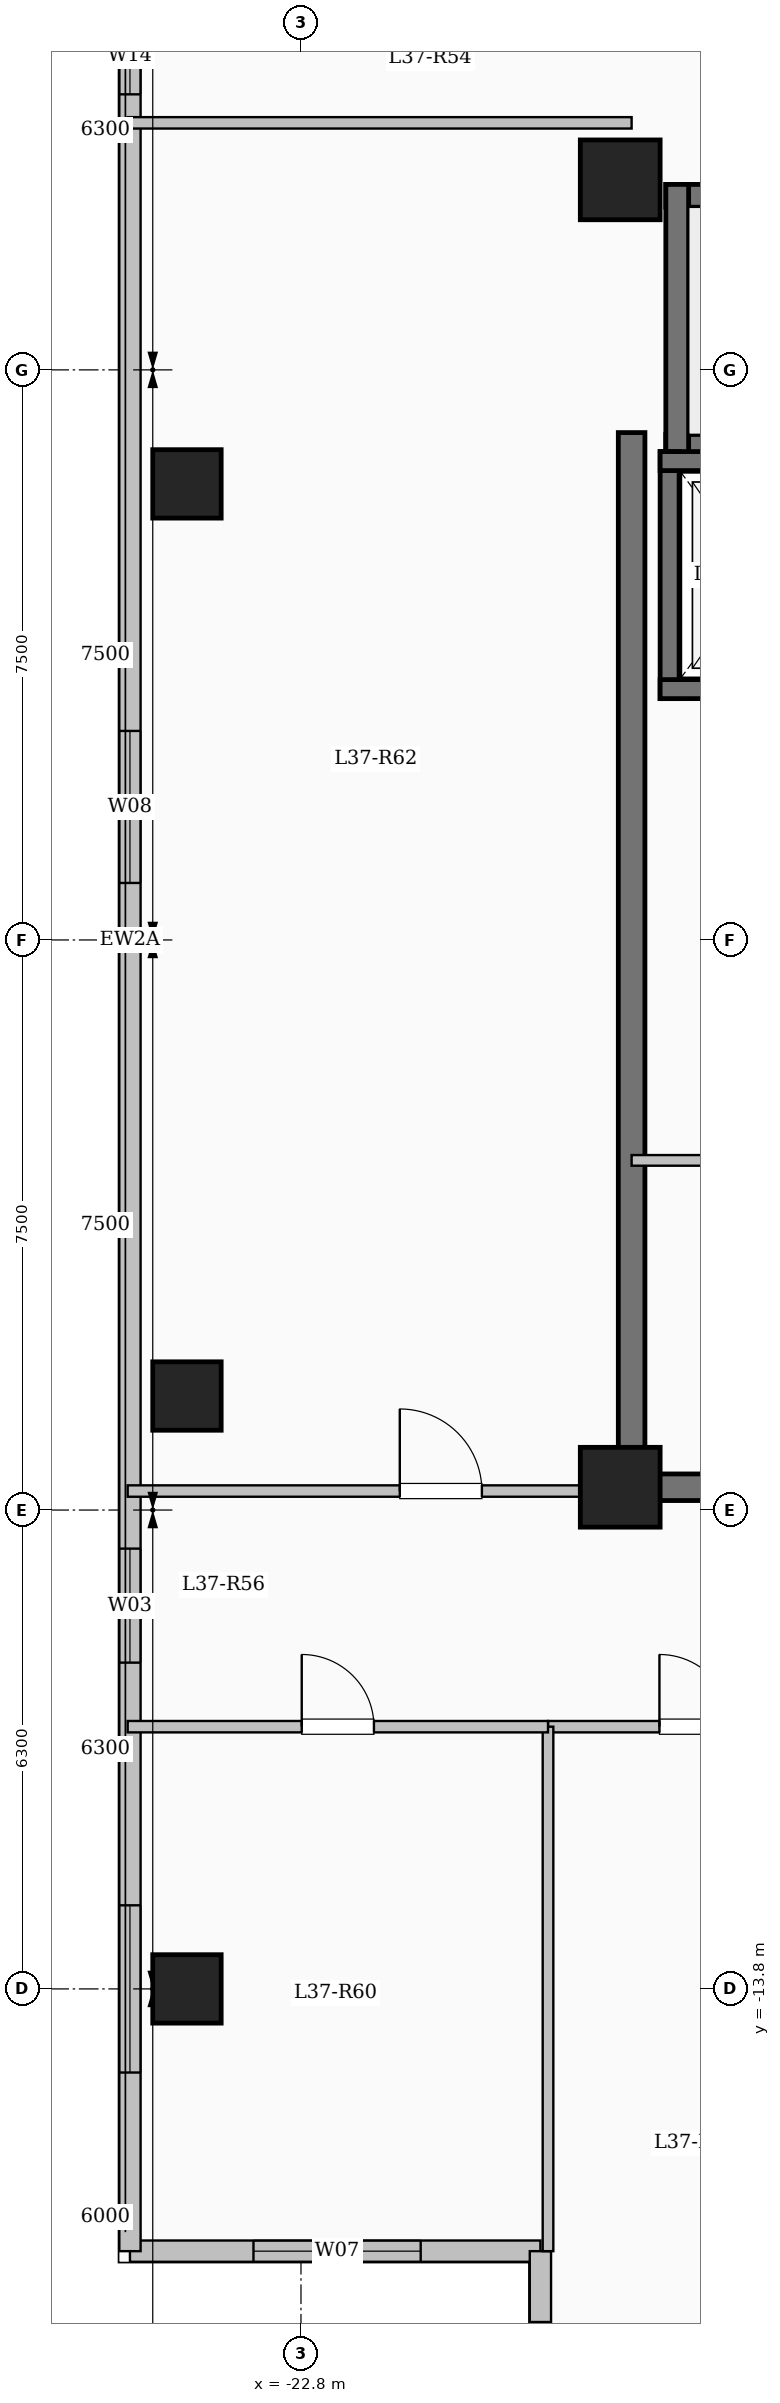
"""IFC4 building model, lengths in metres.
Left out: names, types, materials, properties, quantities, classifications, styles, units other than length and angle.
Written with IfcOpenShell. Run it as: python <this file> out.ifc"""

import sys

from ifc_helpers import new_model, si_unit, direction, frame, frame_2d, origin, origin_2d, place, context, subcontext, project, spatial, rectangle, extrude, element, fill, save


model = new_model("IFC4")
c1 = context("Model", 3, precision=1e-05, world=origin(), true_north=direction((0.0, 1.0)))
c2 = subcontext(c1, "Body", "Model", "MODEL_VIEW")
j1 = project(units=[si_unit("LENGTHUNIT", "METRE"), si_unit("PLANEANGLEUNIT", "RADIAN")], contexts=[c1])
p1 = place(None, origin())
s1 = spatial("IfcSite", under=j1, at=p1, CompositionType="ELEMENT")
p2 = place(p1, origin())
s2 = spatial("IfcBuilding", under=s1, at=p2, CompositionType="ELEMENT")
p3 = place(p2, frame((0.0, 0.0, 139.3)))
s3 = spatial("IfcBuildingStorey", under=s2, at=p3, CompositionType="ELEMENT", Elevation=139.3)
for number, where, z_axis, x_axis in (
    (1, (-18.6, -7.2, 0.0), (0.0, 0.0, 1.0), (1.0, 0.0, 0.0)),
    (2, (-18.6, 10.0, 0.0), (0.0, 0.0, 1.0), (1.0, 0.0, 0.0)),
):
    element("IfcColumn", number, at=place(p3, frame(where, z_axis=z_axis, x_axis=x_axis)), inside=s3, PredefinedType="COLUMN", context=c2, shape_type="SweptSolid", body=[
        extrude(rectangle(XDim=1.05, YDim=1.05, at=origin_2d()), origin(), (0.0, 0.0, 1.0), 3.35),
    ])
for number, where, z_axis, x_axis in (
    (3, (-24.3, -13.8, 0.0), (0.0, 0.0, 1.0), (1.0, 0.0, 0.0)),
    (4, (-24.3, -6.0, 0.0), (0.0, 0.0, 1.0), (1.0, 0.0, 0.0)),
    (5, (-24.3, 6.0, 0.0), (0.0, 0.0, 1.0), (1.0, 0.0, 0.0)),
):
    element("IfcColumn", number, at=place(p3, frame(where, z_axis=z_axis, x_axis=x_axis)), inside=s3, PredefinedType="COLUMN", context=c2, shape_type="SweptSolid", body=[
        extrude(rectangle(XDim=0.9, YDim=0.9, at=origin_2d()), origin(), (0.0, 0.0, 1.0), 3.35),
    ])
p4 = place(p3, frame((-19.65, -17.25, 0.0), z_axis=(0.0, 0.0, 1.0), x_axis=(-1.0, 0.0, 0.0)))
e6 = element("IfcWall", 6, at=p4, inside=s3, PredefinedType="SOLIDWALL", context=c2, shape_type="SweptSolid", body=[
    extrude(rectangle(XDim=5.4, YDim=0.28, at=frame_2d((2.7, 0.0))), origin(), (0.0, 0.0, 1.0), 3.1),
])
p5 = place(p4, frame((1.575, 0.0, 0.9)))
e7 = element("IfcOpeningElement", 7, at=p5, cuts=e6, PredefinedType="OPENING", context=c2, shape_type="SweptSolid", body=[
    extrude(rectangle(XDim=2.2, YDim=1.75, at=frame_2d((1.1, 0.875))), frame((0.0, 0.15, 0.0), z_axis=(0.0, -1.0, 0.0), x_axis=(1.0, 0.0, 0.0)), (0.0, 0.0, 1.0), 0.3),
])
p6 = place(p3, frame((-25.05, -17.25, 0.0), z_axis=(0.0, 0.0, 1.0), x_axis=(0.0, 1.0, 0.0)))
e8 = element("IfcWall", 8, at=p6, inside=s3, PredefinedType="SOLIDWALL", context=c2, shape_type="SweptSolid", body=[
    extrude(rectangle(XDim=34.5, YDim=0.28, at=frame_2d((17.25, 0.0))), origin(), (0.0, 0.0, 1.0), 3.1),
])
p7 = place(p6, frame((2.35, 0.0, 0.9)))
e9 = element("IfcOpeningElement", 9, at=p7, cuts=e8, PredefinedType="OPENING", context=c2, shape_type="SweptSolid", body=[
    extrude(rectangle(XDim=2.2, YDim=1.75, at=frame_2d((1.1, 0.875))), frame((0.0, 0.15, 0.0), z_axis=(0.0, -1.0, 0.0), x_axis=(1.0, 0.0, 0.0)), (0.0, 0.0, 1.0), 0.3),
])
p8 = place(p6, frame((7.742, 0.0, 0.9)))
e10 = element("IfcOpeningElement", 10, at=p8, cuts=e8, PredefinedType="OPENING", context=c2, shape_type="SweptSolid", body=[
    extrude(rectangle(XDim=1.5, YDim=1.65, at=frame_2d((0.75, 0.825))), frame((0.0, 0.15, 0.0), z_axis=(0.0, -1.0, 0.0), x_axis=(1.0, 0.0, 0.0)), (0.0, 0.0, 1.0), 0.3),
])
p9 = place(p6, frame((18.0, 0.0, 0.9)))
e11 = element("IfcOpeningElement", 11, at=p9, cuts=e8, PredefinedType="OPENING", context=c2, shape_type="SweptSolid", body=[
    extrude(rectangle(XDim=2.0, YDim=1.7, at=frame_2d((1.0, 0.85))), frame((0.0, 0.15, 0.0), z_axis=(0.0, -1.0, 0.0), x_axis=(1.0, 0.0, 0.0)), (0.0, 0.0, 1.0), 0.3),
])
p10 = place(p6, frame((28.375, 0.0, 0.95)))
e12 = element("IfcOpeningElement", 12, at=p10, cuts=e8, PredefinedType="OPENING", context=c2, shape_type="SweptSolid", body=[
    extrude(rectangle(XDim=1.0, YDim=1.5, at=frame_2d((0.5, 0.75))), frame((0.0, 0.15, 0.0), z_axis=(0.0, -1.0, 0.0), x_axis=(1.0, 0.0, 0.0)), (0.0, 0.0, 1.0), 0.3),
])
p11 = place(p6, frame((31.125, 0.0, 0.9)))
e13 = element("IfcOpeningElement", 13, at=p11, cuts=e8, PredefinedType="OPENING", context=c2, shape_type="SweptSolid", body=[
    extrude(rectangle(XDim=2.0, YDim=1.7, at=frame_2d((1.0, 0.85))), frame((0.0, 0.15, 0.0), z_axis=(0.0, -1.0, 0.0), x_axis=(1.0, 0.0, 0.0)), (0.0, 0.0, 1.0), 0.3),
])
p12 = place(p3, frame((-19.65, -21.15, 0.0), z_axis=(0.0, 0.0, 1.0), x_axis=(0.0, 1.0, 0.0)))
e14 = element("IfcWall", 14, at=p12, inside=s3, PredefinedType="SOLIDWALL", context=c2, shape_type="SweptSolid", body=[
    extrude(rectangle(XDim=3.9, YDim=0.28, at=frame_2d((1.95, 0.0))), origin(), (0.0, 0.0, 1.0), 3.1),
])
p13 = place(p12, frame((0.968, 0.0, 0.9)))
e15 = element("IfcOpeningElement", 15, at=p13, cuts=e14, PredefinedType="OPENING", context=c2, shape_type="SweptSolid", body=[
    extrude(rectangle(XDim=2.0, YDim=1.7, at=frame_2d((1.0, 0.85))), frame((0.0, 0.15, 0.0), z_axis=(0.0, -1.0, 0.0), x_axis=(1.0, 0.0, 0.0)), (0.0, 0.0, 1.0), 0.3),
])
p14 = place(p3, frame((-18.0, 9.79, 0.0), z_axis=(0.0, 0.0, 1.0), x_axis=(1.0, 0.0, 0.0)))
e16 = element("IfcWall", 16, at=p14, inside=s3, PredefinedType="SHEAR", context=c2, shape_type="SweptSolid", body=[
    extrude(rectangle(XDim=8.0, YDim=0.3, at=frame_2d((4.0, 0.0))), origin(), (0.0, 0.0, 1.0), 3.35),
])
p15 = place(p3, frame((-18.0, 6.5, 0.0), z_axis=(0.0, 0.0, 1.0), x_axis=(1.0, 0.0, 0.0)))
e17 = element("IfcWall", 17, at=p15, inside=s3, PredefinedType="SHEAR", context=c2, shape_type="SweptSolid", body=[
    extrude(rectangle(XDim=8.0, YDim=0.3, at=frame_2d((4.0, 0.0))), origin(), (0.0, 0.0, 1.0), 3.35),
])
p16 = place(p15, frame((6.45, 0.0, 0.0)))
e18 = element("IfcOpeningElement", 18, at=p16, cuts=e17, PredefinedType="OPENING", context=c2, shape_type="SweptSolid", body=[
    extrude(rectangle(XDim=1.0, YDim=2.15, at=frame_2d((0.5, 1.075))), frame((0.0, 0.16, 0.0), z_axis=(0.0, -1.0, 0.0), x_axis=(1.0, 0.0, 0.0)), (0.0, 0.0, 1.0), 0.32),
])
p17 = place(p3, frame((-17.85, 6.35, 0.0), z_axis=(0.0, 0.0, 1.0), x_axis=(0.0, 1.0, 0.0)))
e19 = element("IfcWall", 19, at=p17, inside=s3, PredefinedType="SHEAR", context=c2, shape_type="SweptSolid", body=[
    extrude(rectangle(XDim=3.59, YDim=0.3, at=frame_2d((1.795, 0.0))), origin(), (0.0, 0.0, 1.0), 3.35),
])
p18 = place(p3, frame((-17.95, 3.175, 0.0), z_axis=(0.0, 0.0, 1.0), x_axis=(0.0, 1.0, 0.0)))
e20 = element("IfcWall", 20, at=p18, inside=s3, PredefinedType="SHEAR", context=c2, shape_type="SweptSolid", body=[
    extrude(rectangle(XDim=3.25, YDim=0.25, at=frame_2d((1.625, 0.0))), origin(), (0.0, 0.0, 1.0), 3.35),
])
for number, where, z_axis, x_axis in (
    (21, (-18.075, 3.3, 0.0), (0.0, 0.0, 1.0), (1.0, 0.0, 0.0)),
    (22, (-18.075, 6.3, 0.0), (0.0, 0.0, 1.0), (1.0, 0.0, 0.0)),
):
    element("IfcWall", number, at=place(p3, frame(where, z_axis=z_axis, x_axis=x_axis)), inside=s3, PredefinedType="SHEAR", context=c2, shape_type="SweptSolid", body=[
        extrude(rectangle(XDim=2.55, YDim=0.25, at=frame_2d((1.275, 0.0))), origin(), (0.0, 0.0, 1.0), 3.35),
    ])
p19 = place(p3, frame((-18.45, -7.375, 0.0), z_axis=(0.0, 0.0, 1.0), x_axis=(0.0, 1.0, 0.0)))
e23 = element("IfcWall", 23, at=p19, inside=s3, PredefinedType="SHEAR", context=c2, shape_type="SweptSolid", body=[
    extrude(rectangle(XDim=14.05, YDim=0.35, at=frame_2d((7.025, 0.0))), origin(), (0.0, 0.0, 1.0), 3.35),
])
p20 = place(p3, frame((-18.625, -7.2, 0.0), z_axis=(0.0, 0.0, 1.0), x_axis=(1.0, 0.0, 0.0)))
e24 = element("IfcWall", 24, at=p20, inside=s3, PredefinedType="SHEAR", context=c2, shape_type="SweptSolid", body=[
    extrude(rectangle(XDim=8.55, YDim=0.35, at=frame_2d((4.275, 0.0))), origin(), (0.0, 0.0, 1.0), 3.35),
])
p21 = place(p3, frame((-18.45, -2.9, 0.0), z_axis=(0.0, 0.0, 1.0), x_axis=(1.0, 0.0, 0.0)))
e25 = element("IfcWall", 25, at=p21, inside=s3, PredefinedType="PARTITIONING", context=c2, shape_type="SweptSolid", body=[
    extrude(rectangle(XDim=3.05, YDim=0.14, at=frame_2d((1.525, 0.0))), origin(), (0.0, 0.0, 1.0), 3.1),
])
p22 = place(p21, frame((1.05, 0.0, 0.0)))
e26 = element("IfcOpeningElement", 26, at=p22, cuts=e25, PredefinedType="OPENING", context=c2, shape_type="SweptSolid", body=[
    extrude(rectangle(XDim=0.9, YDim=2.08, at=frame_2d((0.45, 1.04))), frame((0.0, 0.08, 0.0), z_axis=(0.0, -1.0, 0.0), x_axis=(1.0, 0.0, 0.0)), (0.0, 0.0, 1.0), 0.16),
])
p23 = place(p3, frame((-19.55, -10.35, 0.0), z_axis=(0.0, 0.0, 1.0), x_axis=(1.0, 0.0, 0.0)))
e27 = element("IfcWall", 27, at=p23, inside=s3, PredefinedType="PARTITIONING", context=c2, shape_type="SweptSolid", body=[
    extrude(rectangle(XDim=11.0, YDim=0.15, at=frame_2d((5.5, 0.0))), origin(), (0.0, 0.0, 1.0), 3.1),
])
p24 = place(p23, frame((1.466, 0.0, 0.0)))
e28 = element("IfcOpeningElement", 28, at=p24, cuts=e27, PredefinedType="OPENING", context=c2, shape_type="SweptSolid", body=[
    extrude(rectangle(XDim=0.95, YDim=2.15, at=frame_2d((0.475, 1.075))), frame((0.0, 0.085, 0.0), z_axis=(0.0, -1.0, 0.0), x_axis=(1.0, 0.0, 0.0)), (0.0, 0.0, 1.0), 0.17),
])
p25 = place(p23, frame((5.438, 0.0, 0.0)))
e29 = element("IfcOpeningElement", 29, at=p25, cuts=e27, PredefinedType="OPENING", context=c2, shape_type="SweptSolid", body=[
    extrude(rectangle(XDim=0.95, YDim=2.15, at=frame_2d((0.475, 1.075))), frame((0.0, 0.085, 0.0), z_axis=(0.0, -1.0, 0.0), x_axis=(1.0, 0.0, 0.0)), (0.0, 0.0, 1.0), 0.17),
])
p26 = place(p23, frame((8.972, 0.0, 0.0)))
e30 = element("IfcOpeningElement", 30, at=p26, cuts=e27, PredefinedType="OPENING", context=c2, shape_type="SweptSolid", body=[
    extrude(rectangle(XDim=0.95, YDim=2.15, at=frame_2d((0.475, 1.075))), frame((0.0, 0.085, 0.0), z_axis=(0.0, -1.0, 0.0), x_axis=(1.0, 0.0, 0.0)), (0.0, 0.0, 1.0), 0.17),
])
p27 = place(p3, frame((-25.08, -7.25, 0.0), z_axis=(0.0, 0.0, 1.0), x_axis=(1.0, 0.0, 0.0)))
e31 = element("IfcWall", 31, at=p27, inside=s3, PredefinedType="PARTITIONING", context=c2, shape_type="SweptSolid", body=[
    extrude(rectangle(XDim=6.63, YDim=0.15, at=frame_2d((3.315, 0.0))), origin(), (0.0, 0.0, 1.0), 3.1),
])
p28 = place(p27, frame((3.58, 0.0, 0.0)))
e32 = element("IfcOpeningElement", 32, at=p28, cuts=e31, PredefinedType="OPENING", context=c2, shape_type="SweptSolid", body=[
    extrude(rectangle(XDim=1.08, YDim=2.15, at=frame_2d((0.54, 1.075))), frame((0.0, 0.085, 0.0), z_axis=(0.0, -1.0, 0.0), x_axis=(1.0, 0.0, 0.0)), (0.0, 0.0, 1.0), 0.17),
])
p29 = place(p3, frame((-25.08, 10.75, 0.0), z_axis=(0.0, 0.0, 1.0), x_axis=(1.0, 0.0, 0.0)))
e33 = element("IfcWall", 33, at=p29, inside=s3, PredefinedType="PARTITIONING", context=c2, shape_type="SweptSolid", body=[
    extrude(rectangle(XDim=6.63, YDim=0.15, at=frame_2d((3.315, 0.0))), origin(), (0.0, 0.0, 1.0), 3.1),
])
p30 = place(p3, frame((-19.55, -17.25, 0.0), z_axis=(0.0, 0.0, 1.0), x_axis=(0.0, 1.0, 0.0)))
e34 = element("IfcWall", 34, at=p30, inside=s3, PredefinedType="PARTITIONING", context=c2, shape_type="SweptSolid", body=[
    extrude(rectangle(XDim=6.9, YDim=0.14, at=frame_2d((3.45, 0.0))), origin(), (0.0, 0.0, 1.0), 3.1),
])
p31 = place(p3, frame((-25.08, -10.35, 0.0), z_axis=(0.0, 0.0, 1.0), x_axis=(1.0, 0.0, 0.0)))
e35 = element("IfcWall", 35, at=p31, inside=s3, PredefinedType="PARTITIONING", context=c2, shape_type="SweptSolid", body=[
    extrude(rectangle(XDim=5.53, YDim=0.15, at=frame_2d((2.765, 0.0))), origin(), (0.0, 0.0, 1.0), 3.1),
])
p32 = place(p31, frame((2.29, 0.0, 0.0)))
e36 = element("IfcOpeningElement", 36, at=p32, cuts=e35, PredefinedType="OPENING", context=c2, shape_type="SweptSolid", body=[
    extrude(rectangle(XDim=0.95, YDim=2.15, at=frame_2d((0.475, 1.075))), frame((0.0, 0.085, 0.0), z_axis=(0.0, -1.0, 0.0), x_axis=(1.0, 0.0, 0.0)), (0.0, 0.0, 1.0), 0.17),
])
p33 = place(p5, origin())
e37 = element("IfcWindow", 37, at=p33, inside=s3, PartitioningType="SINGLE_PANEL", PredefinedType="WINDOW", context=c2, shape_type="SweptSolid", body=[
    extrude(rectangle(XDim=2.2, YDim=1.75, at=frame_2d((1.1, 0.875))), frame((0.0, 0.03, 0.0), z_axis=(0.0, -1.0, 0.0), x_axis=(1.0, 0.0, 0.0)), (0.0, 0.0, 1.0), 0.06),
])
fill(e7, e37)
p34 = place(p7, origin())
e38 = element("IfcWindow", 38, at=p34, inside=s3, PartitioningType="SINGLE_PANEL", PredefinedType="WINDOW", context=c2, shape_type="SweptSolid", body=[
    extrude(rectangle(XDim=2.2, YDim=1.75, at=frame_2d((1.1, 0.875))), frame((0.0, 0.03, 0.0), z_axis=(0.0, -1.0, 0.0), x_axis=(1.0, 0.0, 0.0)), (0.0, 0.0, 1.0), 0.06),
])
fill(e9, e38)
p35 = place(p8, origin())
e39 = element("IfcWindow", 39, at=p35, inside=s3, PartitioningType="SINGLE_PANEL", PredefinedType="WINDOW", context=c2, shape_type="SweptSolid", body=[
    extrude(rectangle(XDim=1.5, YDim=1.65, at=frame_2d((0.75, 0.825))), frame((0.0, 0.03, 0.0), z_axis=(0.0, -1.0, 0.0), x_axis=(1.0, 0.0, 0.0)), (0.0, 0.0, 1.0), 0.06),
])
fill(e10, e39)
p36 = place(p9, origin())
e40 = element("IfcWindow", 40, at=p36, inside=s3, PartitioningType="SINGLE_PANEL", PredefinedType="WINDOW", context=c2, shape_type="SweptSolid", body=[
    extrude(rectangle(XDim=2.0, YDim=1.7, at=frame_2d((1.0, 0.85))), frame((0.0, 0.03, 0.0), z_axis=(0.0, -1.0, 0.0), x_axis=(1.0, 0.0, 0.0)), (0.0, 0.0, 1.0), 0.06),
])
fill(e11, e40)
p37 = place(p10, origin())
e41 = element("IfcWindow", 41, at=p37, inside=s3, PartitioningType="SINGLE_PANEL", PredefinedType="WINDOW", context=c2, shape_type="SweptSolid", body=[
    extrude(rectangle(XDim=1.0, YDim=1.5, at=frame_2d((0.5, 0.75))), frame((0.0, 0.03, 0.0), z_axis=(0.0, -1.0, 0.0), x_axis=(1.0, 0.0, 0.0)), (0.0, 0.0, 1.0), 0.06),
])
fill(e12, e41)
p38 = place(p13, origin())
e42 = element("IfcWindow", 42, at=p38, inside=s3, PartitioningType="SINGLE_PANEL", PredefinedType="WINDOW", context=c2, shape_type="SweptSolid", body=[
    extrude(rectangle(XDim=2.0, YDim=1.7, at=frame_2d((1.0, 0.85))), frame((0.0, 0.03, 0.0), z_axis=(0.0, -1.0, 0.0), x_axis=(1.0, 0.0, 0.0)), (0.0, 0.0, 1.0), 0.06),
])
fill(e15, e42)
p39 = place(p24, origin())
e43 = element("IfcDoor", 43, at=p39, inside=s3, OperationType="SINGLE_SWING_LEFT", PredefinedType="DOOR", context=c2, shape_type="SweptSolid", body=[
    extrude(rectangle(XDim=0.95, YDim=2.15, at=frame_2d((0.475, 1.075))), frame((0.0, 0.025, 0.0), z_axis=(0.0, -1.0, 0.0), x_axis=(1.0, 0.0, 0.0)), (0.0, 0.0, 1.0), 0.05),
])
fill(e28, e43)
p40 = place(p32, origin())
e44 = element("IfcDoor", 44, at=p40, inside=s3, OperationType="SINGLE_SWING_LEFT", PredefinedType="DOOR", context=c2, shape_type="SweptSolid", body=[
    extrude(rectangle(XDim=0.95, YDim=2.15, at=frame_2d((0.475, 1.075))), frame((0.0, 0.025, 0.0), z_axis=(0.0, -1.0, 0.0), x_axis=(1.0, 0.0, 0.0)), (0.0, 0.0, 1.0), 0.05),
])
fill(e36, e44)
p41 = place(p28, origin())
e45 = element("IfcDoor", 45, at=p41, inside=s3, OperationType="SINGLE_SWING_LEFT", PredefinedType="DOOR", context=c2, shape_type="SweptSolid", body=[
    extrude(rectangle(XDim=1.08, YDim=2.15, at=frame_2d((0.54, 1.075))), frame((0.0, 0.025, 0.0), z_axis=(0.0, -1.0, 0.0), x_axis=(1.0, 0.0, 0.0)), (0.0, 0.0, 1.0), 0.05),
])
fill(e32, e45)
save(model, sys.argv[1])
